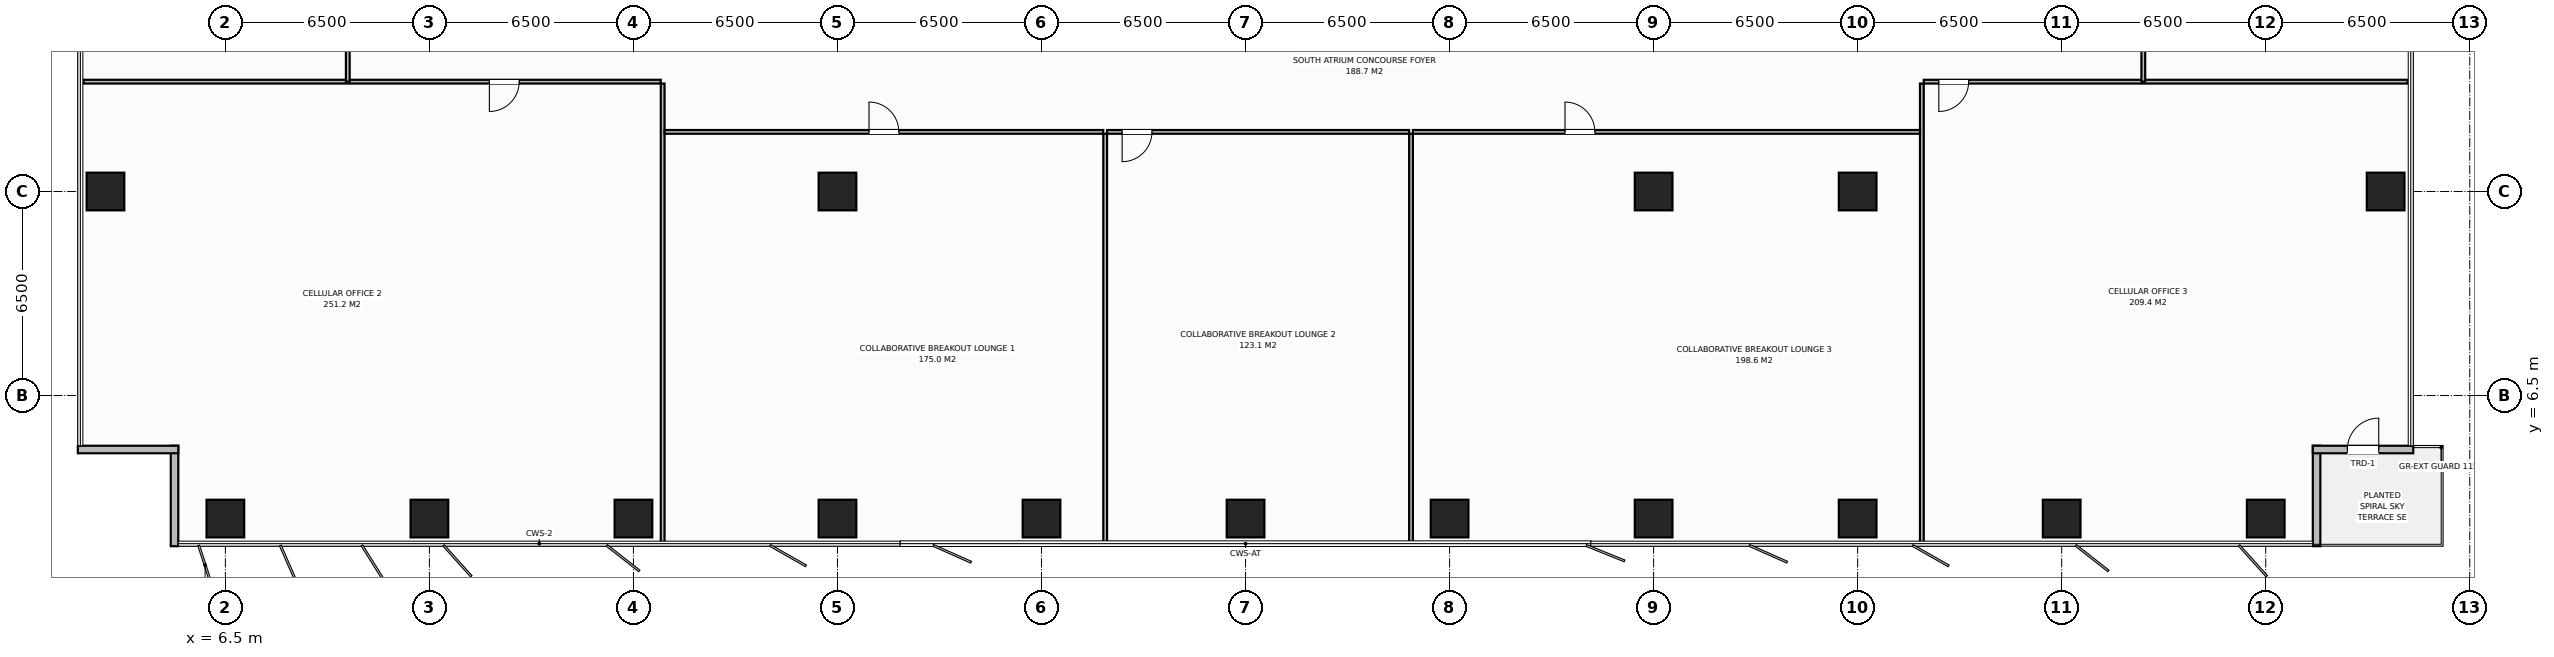
"""IFC4 building model, lengths in metres.
Left out: names, types, materials, properties, quantities, classifications, styles, units other than length and angle.
Written with IfcOpenShell. Run it as: python <this file> out.ifc"""

import sys

from ifc_helpers import new_model, si_unit, direction, frame, frame_2d, origin, origin_2d, place, context, subcontext, project, spatial, rectangle, extrude, element, fill, save


model = new_model("IFC4")
c1 = context("Model", 3, precision=1e-05, world=origin(), true_north=direction((0.0, 1.0)))
c2 = subcontext(c1, "Body", "Model", "MODEL_VIEW")
j1 = project(units=[si_unit("LENGTHUNIT", "METRE"), si_unit("PLANEANGLEUNIT", "RADIAN")], contexts=[c1])
p1 = place(None, origin())
s1 = spatial("IfcSite", under=j1, at=p1, CompositionType="ELEMENT")
p2 = place(p1, origin())
s2 = spatial("IfcBuilding", under=s1, at=p2, CompositionType="ELEMENT")
p3 = place(p2, frame((0.0, 0.0, 108.8)))
s3 = spatial("IfcBuildingStorey", under=s2, at=p3, CompositionType="ELEMENT", Elevation=108.8)
for number, where, z_axis, x_axis in (
    (1, (58.5, 13.0, 0.0), (0.0, 0.0, 1.0), (1.0, 0.0, 0.0)),
    (2, (26.0, 13.0, 0.0), (0.0, 0.0, 1.0), (1.0, 0.0, 0.0)),
    (3, (52.0, 13.0, 0.0), (0.0, 0.0, 1.0), (1.0, 0.0, 0.0)),
    (4, (6.5, 2.58, 0.0), (0.0, 0.0, 1.0), (1.0, 0.0, 0.0)),
    (5, (13.0, 2.58, 0.0), (0.0, 0.0, 1.0), (1.0, 0.0, 0.0)),
    (6, (19.5, 2.58, 0.0), (0.0, 0.0, 1.0), (1.0, 0.0, 0.0)),
    (7, (26.0, 2.58, 0.0), (0.0, 0.0, 1.0), (1.0, 0.0, 0.0)),
    (8, (32.5, 2.58, 0.0), (0.0, 0.0, 1.0), (1.0, 0.0, 0.0)),
    (9, (39.0, 2.58, 0.0), (0.0, 0.0, 1.0), (1.0, 0.0, 0.0)),
    (10, (45.5, 2.58, 0.0), (0.0, 0.0, 1.0), (1.0, 0.0, 0.0)),
    (11, (52.0, 2.58, 0.0), (0.0, 0.0, 1.0), (1.0, 0.0, 0.0)),
    (12, (58.5, 2.58, 0.0), (0.0, 0.0, 1.0), (1.0, 0.0, 0.0)),
    (13, (65.0, 2.58, 0.0), (0.0, 0.0, 1.0), (1.0, 0.0, 0.0)),
    (14, (71.5, 2.58, 0.0), (0.0, 0.0, 1.0), (1.0, 0.0, 0.0)),
    (15, (2.68, 13.0, 0.0), (0.0, 0.0, 1.0), (1.0, 0.0, 0.0)),
    (16, (75.32, 13.0, 0.0), (0.0, 0.0, 1.0), (1.0, 0.0, 0.0)),
):
    element("IfcColumn", number, at=place(p3, frame(where, z_axis=z_axis, x_axis=x_axis)), inside=s3, PredefinedType="COLUMN", context=c2, shape_type="SweptSolid", body=[
        extrude(rectangle(XDim=1.2, YDim=1.2, at=origin_2d()), origin(), (0.0, 0.0, 1.0), 3.8),
    ])
for number, where, z_axis, x_axis in (
    (17, (4.88, 1.7, 0.0), (0.0, 0.0, 1.0), (0.0, 1.0, 0.0)),
    (18, (5.0, 4.78, 0.0), (0.0, 0.0, 1.0), (-1.0, 0.0, 0.0)),
    (19, (73.12, 4.9, 0.0), (0.0, 0.0, 1.0), (0.0, -1.0, 0.0)),
):
    element("IfcWall", number, at=place(p3, frame(where, z_axis=z_axis, x_axis=x_axis)), inside=s3, PredefinedType="STANDARD", context=c2, shape_type="SweptSolid", body=[
        extrude(rectangle(XDim=3.2, YDim=0.24, at=frame_2d((1.6, 0.0))), origin(), (0.0, 0.0, 1.0), 3.565),
    ])
p4 = place(p3, frame((76.2, 4.78, 0.0), z_axis=(0.0, 0.0, 1.0), x_axis=(-1.0, 0.0, 0.0)))
e20 = element("IfcWall", 20, at=p4, inside=s3, PredefinedType="STANDARD", context=c2, shape_type="SweptSolid", body=[
    extrude(rectangle(XDim=3.2, YDim=0.24, at=frame_2d((1.6, 0.0))), origin(), (0.0, 0.0, 1.0), 3.565),
])
p5 = place(p4, frame((1.1, 0.0, 0.0)))
e21 = element("IfcOpeningElement", 21, at=p5, cuts=e20, PredefinedType="OPENING", context=c2, shape_type="SweptSolid", body=[
    extrude(rectangle(XDim=1.0, YDim=2.2, at=frame_2d((0.5, 1.1))), frame((0.0, 0.13, 0.0), z_axis=(0.0, -1.0, 0.0), x_axis=(1.0, 0.0, 0.0)), (0.0, 0.0, 1.0), 0.26),
])
p6 = place(p3, frame((20.431, 1.72, 0.0), z_axis=(0.0, 0.0, 1.0), x_axis=(0.0, 1.0, 0.0)))
e22 = element("IfcWall", 22, at=p6, inside=s3, PredefinedType="PARTITIONING", context=c2, shape_type="SweptSolid", body=[
    extrude(rectangle(XDim=14.72, YDim=0.12, at=frame_2d((7.36, 0.0))), origin(), (0.0, 0.0, 1.0), 3.565),
])
p7 = place(p3, frame((1.98, 16.5, 0.0), z_axis=(0.0, 0.0, 1.0), x_axis=(1.0, 0.0, 0.0)))
e23 = element("IfcWall", 23, at=p7, inside=s3, PredefinedType="PARTITIONING", context=c2, shape_type="SweptSolid", body=[
    extrude(rectangle(XDim=18.391, YDim=0.12, at=frame_2d((9.195, 0.0))), origin(), (0.0, 0.0, 1.0), 3.565),
])
p8 = place(p7, frame((12.93, 0.0, 0.0)))
e24 = element("IfcOpeningElement", 24, at=p8, cuts=e23, PredefinedType="OPENING", context=c2, shape_type="SweptSolid", body=[
    extrude(rectangle(XDim=0.95, YDim=2.15, at=frame_2d((0.475, 1.075))), frame((0.0, 0.07, 0.0), z_axis=(0.0, -1.0, 0.0), x_axis=(1.0, 0.0, 0.0)), (0.0, 0.0, 1.0), 0.14),
])
p9 = place(p3, frame((34.528, 1.72, 0.0), z_axis=(0.0, 0.0, 1.0), x_axis=(0.0, 1.0, 0.0)))
e25 = element("IfcWall", 25, at=p9, inside=s3, PredefinedType="PARTITIONING", context=c2, shape_type="SweptSolid", body=[
    extrude(rectangle(XDim=13.12, YDim=0.12, at=frame_2d((6.56, 0.0))), origin(), (0.0, 0.0, 1.0), 3.565),
])
p10 = place(p3, frame((20.491, 14.9, 0.0), z_axis=(0.0, 0.0, 1.0), x_axis=(1.0, 0.0, 0.0)))
e26 = element("IfcWall", 26, at=p10, inside=s3, PredefinedType="PARTITIONING", context=c2, shape_type="SweptSolid", body=[
    extrude(rectangle(XDim=13.977, YDim=0.12, at=frame_2d((6.989, 0.0))), origin(), (0.0, 0.0, 1.0), 3.565),
])
p11 = place(p10, frame((6.514, 0.0, 0.0)))
e27 = element("IfcOpeningElement", 27, at=p11, cuts=e26, PredefinedType="OPENING", context=c2, shape_type="SweptSolid", body=[
    extrude(rectangle(XDim=0.95, YDim=2.15, at=frame_2d((0.475, 1.075))), frame((0.0, 0.07, 0.0), z_axis=(0.0, -1.0, 0.0), x_axis=(1.0, 0.0, 0.0)), (0.0, 0.0, 1.0), 0.14),
])
p12 = place(p3, frame((44.271, 1.72, 0.0), z_axis=(0.0, 0.0, 1.0), x_axis=(0.0, 1.0, 0.0)))
e28 = element("IfcWall", 28, at=p12, inside=s3, PredefinedType="PARTITIONING", context=c2, shape_type="SweptSolid", body=[
    extrude(rectangle(XDim=13.12, YDim=0.12, at=frame_2d((6.56, 0.0))), origin(), (0.0, 0.0, 1.0), 3.565),
])
p13 = place(p3, frame((34.588, 14.9, 0.0), z_axis=(0.0, 0.0, 1.0), x_axis=(1.0, 0.0, 0.0)))
e29 = element("IfcWall", 29, at=p13, inside=s3, PredefinedType="PARTITIONING", context=c2, shape_type="SweptSolid", body=[
    extrude(rectangle(XDim=9.624, YDim=0.12, at=frame_2d((4.812, 0.0))), origin(), (0.0, 0.0, 1.0), 3.565),
])
p14 = place(p13, frame((0.48, 0.0, 0.0)))
e30 = element("IfcOpeningElement", 30, at=p14, cuts=e29, PredefinedType="OPENING", context=c2, shape_type="SweptSolid", body=[
    extrude(rectangle(XDim=0.95, YDim=2.15, at=frame_2d((0.475, 1.075))), frame((0.0, 0.07, 0.0), z_axis=(0.0, -1.0, 0.0), x_axis=(1.0, 0.0, 0.0)), (0.0, 0.0, 1.0), 0.14),
])
p15 = place(p3, frame((60.546, 1.72, 0.0), z_axis=(0.0, 0.0, 1.0), x_axis=(0.0, 1.0, 0.0)))
e31 = element("IfcWall", 31, at=p15, inside=s3, PredefinedType="PARTITIONING", context=c2, shape_type="SweptSolid", body=[
    extrude(rectangle(XDim=14.72, YDim=0.12, at=frame_2d((7.36, 0.0))), origin(), (0.0, 0.0, 1.0), 3.565),
])
p16 = place(p3, frame((44.332, 14.9, 0.0), z_axis=(0.0, 0.0, 1.0), x_axis=(1.0, 0.0, 0.0)))
e32 = element("IfcWall", 32, at=p16, inside=s3, PredefinedType="PARTITIONING", context=c2, shape_type="SweptSolid", body=[
    extrude(rectangle(XDim=16.154, YDim=0.12, at=frame_2d((8.077, 0.0))), origin(), (0.0, 0.0, 1.0), 3.565),
])
p17 = place(p16, frame((4.846, 0.0, 0.0)))
e33 = element("IfcOpeningElement", 33, at=p17, cuts=e32, PredefinedType="OPENING", context=c2, shape_type="SweptSolid", body=[
    extrude(rectangle(XDim=0.95, YDim=2.15, at=frame_2d((0.475, 1.075))), frame((0.0, 0.07, 0.0), z_axis=(0.0, -1.0, 0.0), x_axis=(1.0, 0.0, 0.0)), (0.0, 0.0, 1.0), 0.14),
])
p18 = place(p3, frame((60.606, 16.5, 0.0), z_axis=(0.0, 0.0, 1.0), x_axis=(1.0, 0.0, 0.0)))
e34 = element("IfcWall", 34, at=p18, inside=s3, PredefinedType="PARTITIONING", context=c2, shape_type="SweptSolid", body=[
    extrude(rectangle(XDim=15.414, YDim=0.12, at=frame_2d((7.707, 0.0))), origin(), (0.0, 0.0, 1.0), 3.565),
])
p19 = place(p18, frame((0.48, 0.0, 0.0)))
e35 = element("IfcOpeningElement", 35, at=p19, cuts=e34, PredefinedType="OPENING", context=c2, shape_type="SweptSolid", body=[
    extrude(rectangle(XDim=0.95, YDim=2.15, at=frame_2d((0.475, 1.075))), frame((0.0, 0.07, 0.0), z_axis=(0.0, -1.0, 0.0), x_axis=(1.0, 0.0, 0.0)), (0.0, 0.0, 1.0), 0.14),
])
p20 = place(p3, frame((10.4, 16.5, 0.0), z_axis=(0.0, 0.0, 1.0), x_axis=(0.0, 1.0, 0.0)))
e36 = element("IfcWall", 36, at=p20, inside=s3, PredefinedType="PARTITIONING", context=c2, shape_type="SweptSolid", body=[
    extrude(rectangle(XDim=9.5, YDim=0.12, at=frame_2d((4.75, 0.0))), origin(), (0.0, 0.0, 1.0), 3.565),
])
p21 = place(p20, frame((5.325, 0.0, 0.0)))
e37 = element("IfcOpeningElement", 37, at=p21, cuts=e36, PredefinedType="OPENING", context=c2, shape_type="SweptSolid", body=[
    extrude(rectangle(XDim=0.95, YDim=2.15, at=frame_2d((0.475, 1.075))), frame((0.0, 0.07, 0.0), z_axis=(0.0, -1.0, 0.0), x_axis=(1.0, 0.0, 0.0)), (0.0, 0.0, 1.0), 0.14),
])
p22 = place(p3, frame((67.6, 16.5, 0.0), z_axis=(0.0, 0.0, 1.0), x_axis=(0.0, 1.0, 0.0)))
e38 = element("IfcWall", 38, at=p22, inside=s3, PredefinedType="PARTITIONING", context=c2, shape_type="SweptSolid", body=[
    extrude(rectangle(XDim=16.9, YDim=0.12, at=frame_2d((8.45, 0.0))), origin(), (0.0, 0.0, 1.0), 3.565),
])
p23 = place(p22, frame((9.025, 0.0, 0.0)))
e39 = element("IfcOpeningElement", 39, at=p23, cuts=e38, PredefinedType="OPENING", context=c2, shape_type="SweptSolid", body=[
    extrude(rectangle(XDim=0.95, YDim=2.15, at=frame_2d((0.475, 1.075))), frame((0.0, 0.07, 0.0), z_axis=(0.0, -1.0, 0.0), x_axis=(1.0, 0.0, 0.0)), (0.0, 0.0, 1.0), 0.14),
])
p24 = place(p5, origin())
e40 = element("IfcDoor", 40, at=p24, inside=s3, OperationType="SINGLE_SWING_RIGHT", PredefinedType="DOOR", context=c2, shape_type="SweptSolid", body=[
    extrude(rectangle(XDim=1.0, YDim=2.2, at=frame_2d((0.5, 1.1))), frame((0.0, 0.025, 0.0), z_axis=(0.0, -1.0, 0.0), x_axis=(1.0, 0.0, 0.0)), (0.0, 0.0, 1.0), 0.05),
])
fill(e21, e40)
p25 = place(p8, origin())
e41 = element("IfcDoor", 41, at=p25, inside=s3, OperationType="SINGLE_SWING_RIGHT", PredefinedType="DOOR", context=c2, shape_type="SweptSolid", body=[
    extrude(rectangle(XDim=0.95, YDim=2.15, at=frame_2d((0.475, 1.075))), frame((0.0, 0.025, 0.0), z_axis=(0.0, -1.0, 0.0), x_axis=(1.0, 0.0, 0.0)), (0.0, 0.0, 1.0), 0.05),
])
fill(e24, e41)
p26 = place(p11, origin())
e42 = element("IfcDoor", 42, at=p26, inside=s3, OperationType="SINGLE_SWING_LEFT", PredefinedType="DOOR", context=c2, shape_type="SweptSolid", body=[
    extrude(rectangle(XDim=0.95, YDim=2.15, at=frame_2d((0.475, 1.075))), frame((0.0, 0.025, 0.0), z_axis=(0.0, -1.0, 0.0), x_axis=(1.0, 0.0, 0.0)), (0.0, 0.0, 1.0), 0.05),
])
fill(e27, e42)
p27 = place(p14, origin())
e43 = element("IfcDoor", 43, at=p27, inside=s3, OperationType="SINGLE_SWING_RIGHT", PredefinedType="DOOR", context=c2, shape_type="SweptSolid", body=[
    extrude(rectangle(XDim=0.95, YDim=2.15, at=frame_2d((0.475, 1.075))), frame((0.0, 0.025, 0.0), z_axis=(0.0, -1.0, 0.0), x_axis=(1.0, 0.0, 0.0)), (0.0, 0.0, 1.0), 0.05),
])
fill(e30, e43)
p28 = place(p17, origin())
e44 = element("IfcDoor", 44, at=p28, inside=s3, OperationType="SINGLE_SWING_LEFT", PredefinedType="DOOR", context=c2, shape_type="SweptSolid", body=[
    extrude(rectangle(XDim=0.95, YDim=2.15, at=frame_2d((0.475, 1.075))), frame((0.0, 0.025, 0.0), z_axis=(0.0, -1.0, 0.0), x_axis=(1.0, 0.0, 0.0)), (0.0, 0.0, 1.0), 0.05),
])
fill(e33, e44)
p29 = place(p19, origin())
e45 = element("IfcDoor", 45, at=p29, inside=s3, OperationType="SINGLE_SWING_RIGHT", PredefinedType="DOOR", context=c2, shape_type="SweptSolid", body=[
    extrude(rectangle(XDim=0.95, YDim=2.15, at=frame_2d((0.475, 1.075))), frame((0.0, 0.025, 0.0), z_axis=(0.0, -1.0, 0.0), x_axis=(1.0, 0.0, 0.0)), (0.0, 0.0, 1.0), 0.05),
])
fill(e35, e45)
save(model, sys.argv[1])
